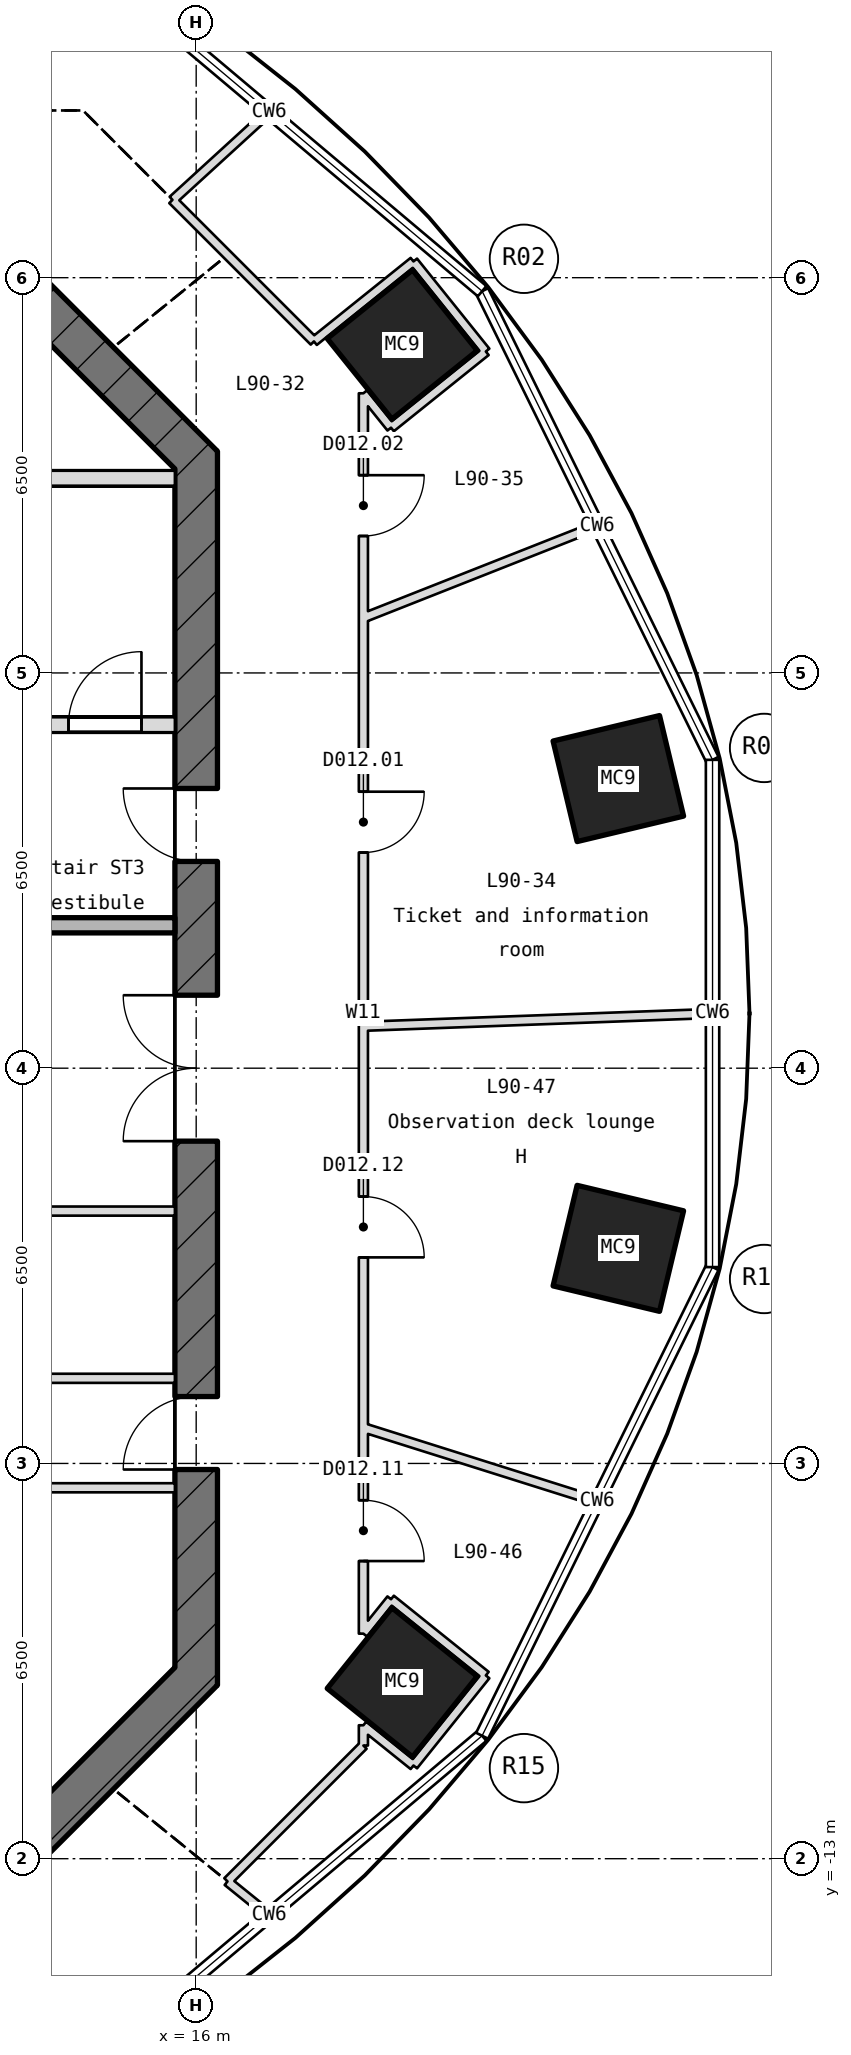
"""IFC4 building model, lengths in metres.
Left out: names, types, materials, properties, quantities, classifications, styles, units other than length and angle.
Written with IfcOpenShell. Run it as: python <this file> out.ifc"""

import sys

from ifc_helpers import new_model, si_unit, direction, frame, frame_2d, origin, origin_2d, place, context, subcontext, project, spatial, rectangle, hollow_rectangle, extrude, element, fill, save


model = new_model("IFC4")
c1 = context("Model", 3, precision=1e-05, world=origin(), true_north=direction((0.0, 1.0)))
c2 = subcontext(c1, "Body", "Model", "MODEL_VIEW")
j1 = project(units=[si_unit("LENGTHUNIT", "METRE"), si_unit("PLANEANGLEUNIT", "RADIAN")], contexts=[c1])
p1 = place(None, origin())
s1 = spatial("IfcSite", under=j1, at=p1, CompositionType="ELEMENT")
p2 = place(p1, origin())
s2 = spatial("IfcBuilding", under=s1, at=p2, CompositionType="ELEMENT")
p3 = place(p2, frame((0.0, 0.0, 396.55)))
s3 = spatial("IfcBuildingStorey", under=s2, at=p3, CompositionType="ELEMENT", Elevation=396.55)
for number, where, z_axis, x_axis in (
    (1, (22.943, 4.763, -0.25), (0.0, 0.0, 1.0), (0.233, -0.973, 0.0)),
    (2, (19.389, 11.9, -0.25), (0.0, 0.0, 1.0), (0.626, -0.78, 0.0)),
    (3, (12.823, 17.363, -0.25), (0.0, 0.0, 1.0), (0.874, -0.486, 0.0)),
    (4, (12.823, -15.563, -0.25), (0.0, 0.0, 1.0), (-0.874, -0.486, 0.0)),
    (5, (19.389, -10.1, -0.25), (0.0, 0.0, 1.0), (-0.626, -0.78, 0.0)),
    (6, (22.943, -2.963, -0.25), (0.0, 0.0, 1.0), (-0.233, -0.973, 0.0)),
):
    element("IfcColumn", number, at=place(p3, frame(where, z_axis=z_axis, x_axis=x_axis)), inside=s3, PredefinedType="COLUMN", context=c2, shape_type="SweptSolid", body=[
        extrude(hollow_rectangle(XDim=1.7, YDim=1.8, WallThickness=0.05, at=origin_2d()), origin(), (0.0, 0.0, 1.0), 5.4),
    ])
p4 = place(p3, frame((12.897, -13.103, -0.25), z_axis=(0.0, 0.0, 1.0), x_axis=(0.707106781187, 0.707106781187, 0.0)))
e7 = element("IfcWall", 7, at=p4, inside=s3, PredefinedType="SHEAR", context=c2, shape_type="SweptSolid", body=[
    extrude(rectangle(XDim=4.533, YDim=0.7, at=frame_2d((2.266, 0.0))), origin(), (0.0, 0.0, 1.0), 5.4),
])
p5 = place(p3, frame((16.0, -10.145, -0.25), z_axis=(0.0, 0.0, 1.0), x_axis=(0.0, 1.0, 0.0)))
e8 = element("IfcWall", 8, at=p5, inside=s3, PredefinedType="SHEAR", context=c2, shape_type="SweptSolid", body=[
    extrude(rectangle(XDim=20.29, YDim=0.7, at=frame_2d((10.145, 0.0))), origin(), (0.0, 0.0, 1.0), 5.4),
])
p6 = place(p5, frame((8.945, 0.0, 0.25)))
e9 = element("IfcOpeningElement", 9, at=p6, cuts=e8, PredefinedType="OPENING", context=c2, shape_type="SweptSolid", body=[
    extrude(rectangle(XDim=2.4, YDim=2.1, at=frame_2d((1.2, 1.05))), frame((0.0, 0.36, 0.0), z_axis=(0.0, -1.0, 0.0), x_axis=(1.0, 0.0, 0.0)), (0.0, 0.0, 1.0), 0.72),
])
p7 = place(p5, frame((13.545, 0.0, 0.25)))
e10 = element("IfcOpeningElement", 10, at=p7, cuts=e8, PredefinedType="OPENING", context=c2, shape_type="SweptSolid", body=[
    extrude(rectangle(XDim=1.2, YDim=2.1, at=frame_2d((0.6, 1.05))), frame((0.0, 0.36, 0.0), z_axis=(0.0, -1.0, 0.0), x_axis=(1.0, 0.0, 0.0)), (0.0, 0.0, 1.0), 0.72),
])
p8 = place(p5, frame((3.545, 0.0, 0.25)))
e11 = element("IfcOpeningElement", 11, at=p8, cuts=e8, PredefinedType="OPENING", context=c2, shape_type="SweptSolid", body=[
    extrude(rectangle(XDim=1.2, YDim=2.1, at=frame_2d((0.6, 1.05))), frame((0.0, 0.36, 0.0), z_axis=(0.0, -1.0, 0.0), x_axis=(1.0, 0.0, 0.0)), (0.0, 0.0, 1.0), 0.72),
])
p9 = place(p3, frame((16.103, 9.897, -0.25), z_axis=(0.0, 0.0, 1.0), x_axis=(-0.707106781187, 0.707106781187, 0.0)))
e12 = element("IfcWall", 12, at=p9, inside=s3, PredefinedType="SHEAR", context=c2, shape_type="SweptSolid", body=[
    extrude(rectangle(XDim=4.533, YDim=0.7, at=frame_2d((2.266, 0.0))), origin(), (0.0, 0.0, 1.0), 5.4),
])
p10 = place(p3, frame((8.55, -6.9, 0.0), z_axis=(0.0, 0.0, 1.0), x_axis=(1.0, 0.0, 0.0)))
e13 = element("IfcWall", 13, at=p10, inside=s3, PredefinedType="PARTITIONING", context=c2, shape_type="SweptSolid", body=[
    extrude(rectangle(XDim=7.1, YDim=0.15, at=frame_2d((3.55, 0.0))), origin(), (0.0, 0.0, 1.0), 5.15),
])
p11 = place(p10, frame((2.975, 0.0, 0.0)))
e14 = element("IfcOpeningElement", 14, at=p11, cuts=e13, PredefinedType="OPENING", context=c2, shape_type="SweptSolid", body=[
    extrude(rectangle(XDim=1.0, YDim=2.1, at=frame_2d((0.5, 1.05))), frame((0.0, 0.085, 0.0), z_axis=(0.0, -1.0, 0.0), x_axis=(1.0, 0.0, 0.0)), (0.0, 0.0, 1.0), 0.17),
])
p12 = place(p3, frame((8.55, -5.1, 0.0), z_axis=(0.0, 0.0, 1.0), x_axis=(1.0, 0.0, 0.0)))
e15 = element("IfcWall", 15, at=p12, inside=s3, PredefinedType="PARTITIONING", context=c2, shape_type="SweptSolid", body=[
    extrude(rectangle(XDim=7.1, YDim=0.15, at=frame_2d((3.55, 0.0))), origin(), (0.0, 0.0, 1.0), 5.15),
])
p13 = place(p12, frame((2.975, 0.0, 0.0)))
e16 = element("IfcOpeningElement", 16, at=p13, cuts=e15, PredefinedType="OPENING", context=c2, shape_type="SweptSolid", body=[
    extrude(rectangle(XDim=1.0, YDim=2.1, at=frame_2d((0.5, 1.05))), frame((0.0, 0.085, 0.0), z_axis=(0.0, -1.0, 0.0), x_axis=(1.0, 0.0, 0.0)), (0.0, 0.0, 1.0), 0.17),
])
p14 = place(p3, frame((8.4, -2.35, 0.0), z_axis=(0.0, 0.0, 1.0), x_axis=(1.0, 0.0, 0.0)))
e17 = element("IfcWall", 17, at=p14, inside=s3, PredefinedType="PARTITIONING", context=c2, shape_type="SweptSolid", body=[
    extrude(rectangle(XDim=7.25, YDim=0.15, at=frame_2d((3.625, 0.0))), origin(), (0.0, 0.0, 1.0), 5.15),
])
p15 = place(p3, frame((8.4, 2.35, 0.0), z_axis=(0.0, 0.0, 1.0), x_axis=(1.0, 0.0, 0.0)))
e18 = element("IfcWall", 18, at=p15, inside=s3, PredefinedType="STANDARD", context=c2, shape_type="SweptSolid", body=[
    extrude(rectangle(XDim=7.25, YDim=0.25, at=frame_2d((3.625, 0.0))), origin(), (0.0, 0.0, 1.0), 5.15),
])
p16 = place(p3, frame((8.55, 5.65, -0.25), z_axis=(0.0, 0.0, 1.0), x_axis=(1.0, 0.0, 0.0)))
e19 = element("IfcWall", 19, at=p16, inside=s3, PredefinedType="SHEAR", context=c2, shape_type="SweptSolid", body=[
    extrude(rectangle(XDim=7.1, YDim=0.25, at=frame_2d((3.55, 0.0))), origin(), (0.0, 0.0, 1.0), 5.4),
])
p17 = place(p16, frame((5.35, 0.0, 0.25)))
e20 = element("IfcOpeningElement", 20, at=p17, cuts=e19, PredefinedType="OPENING", context=c2, shape_type="SweptSolid", body=[
    extrude(rectangle(XDim=1.2, YDim=2.1, at=frame_2d((0.6, 1.05))), frame((0.0, 0.135, 0.0), z_axis=(0.0, -1.0, 0.0), x_axis=(1.0, 0.0, 0.0)), (0.0, 0.0, 1.0), 0.27),
])
p18 = place(p3, frame((8.55, 9.7, -0.25), z_axis=(0.0, 0.0, 1.0), x_axis=(1.0, 0.0, 0.0)))
e21 = element("IfcWall", 21, at=p18, inside=s3, PredefinedType="SHEAR", context=c2, shape_type="SweptSolid", body=[
    extrude(rectangle(XDim=7.1, YDim=0.25, at=frame_2d((3.55, 0.0))), origin(), (0.0, 0.0, 1.0), 5.4),
])
p19 = place(p3, frame((18.75, 0.689, 0.0), z_axis=(0.0, 0.0, 1.0), x_axis=(0.999324436598, 0.036751468252, 0.0)))
e22 = element("IfcWall", 22, at=p19, inside=s3, PredefinedType="PARTITIONING", context=c2, shape_type="SweptSolid", body=[
    extrude(rectangle(XDim=5.726, YDim=0.15, at=frame_2d((2.863, 0.0))), origin(), (0.0, 0.0, 1.0), 5.15),
])
p20 = place(p3, frame((18.75, 7.405, 0.0), z_axis=(0.0, 0.0, 1.0), x_axis=(0.930087514152, 0.367338013305, 0.0)))
e23 = element("IfcWall", 23, at=p20, inside=s3, PredefinedType="PARTITIONING", context=c2, shape_type="SweptSolid", body=[
    extrude(rectangle(XDim=4.117, YDim=0.15, at=frame_2d((2.058, 0.0))), origin(), (0.0, 0.0, 1.0), 5.15),
])
p21 = place(p3, frame((19.204, 10.533, 0.0), z_axis=(0.0, 0.0, 1.0), x_axis=(0.779700462406, 0.626152688187, 0.0)))
e24 = element("IfcWall", 24, at=p21, inside=s3, PredefinedType="PARTITIONING", context=c2, shape_type="SweptSolid", body=[
    extrude(rectangle(XDim=2.0, YDim=0.15, at=frame_2d((1.0, 0.0))), origin(), (0.0, 0.0, 1.0), 5.15),
])
p22 = place(p3, frame((17.937, 11.952, 0.0), z_axis=(0.0, 0.0, 1.0), x_axis=(0.779676200118, 0.626182898976, 0.0)))
e25 = element("IfcWall", 25, at=p22, inside=s3, PredefinedType="PARTITIONING", context=c2, shape_type="SweptSolid", body=[
    extrude(rectangle(XDim=2.1, YDim=0.15, at=frame_2d((1.05, 0.0))), origin(), (0.0, 0.0, 1.0), 5.15),
])
p23 = place(p3, frame((15.614, 14.276, 0.0), z_axis=(0.0, 0.0, 1.0), x_axis=(0.738014143535, 0.674785242831, 0.0)))
e26 = element("IfcWall", 26, at=p23, inside=s3, PredefinedType="PARTITIONING", context=c2, shape_type="SweptSolid", body=[
    extrude(rectangle(XDim=2.131, YDim=0.15, at=frame_2d((1.066, 0.0))), origin(), (0.0, 0.0, 1.0), 5.15),
])
p24 = place(p3, frame((16.515, -13.374, 0.0), z_axis=(0.0, 0.0, 1.0), x_axis=(0.707106781187, 0.707106781187, 0.0)))
e27 = element("IfcWall", 27, at=p24, inside=s3, PredefinedType="PARTITIONING", context=c2, shape_type="SweptSolid", body=[
    extrude(rectangle(XDim=3.16, YDim=0.15, at=frame_2d((1.58, 0.0))), origin(), (0.0, 0.0, 1.0), 5.15),
])
p25 = place(p3, frame((19.574, -11.467, 0.0), z_axis=(0.0, 0.0, 1.0), x_axis=(0.6262293762, 0.779638870493, 0.0)))
e28 = element("IfcWall", 28, at=p25, inside=s3, PredefinedType="PARTITIONING", context=c2, shape_type="SweptSolid", body=[
    extrude(rectangle(XDim=1.9, YDim=0.15, at=frame_2d((0.95, 0.0))), origin(), (0.0, 0.0, 1.0), 5.15),
])
p26 = place(p3, frame((18.75, -9.299, 0.0), z_axis=(0.0, 0.0, 1.0), x_axis=(0.626007581317, 0.77981697092, 0.0)))
e29 = element("IfcWall", 29, at=p26, inside=s3, PredefinedType="PARTITIONING", context=c2, shape_type="SweptSolid", body=[
    extrude(rectangle(XDim=0.725, YDim=0.15, at=frame_2d((0.363, 0.0))), origin(), (0.0, 0.0, 1.0), 5.15),
])
p27 = place(p3, frame((18.75, -11.139, 0.0), z_axis=(0.0, 0.0, 1.0), x_axis=(0.0, 1.0, 0.0)))
e30 = element("IfcWall", 30, at=p27, inside=s3, PredefinedType="PARTITIONING", context=c2, shape_type="SweptSolid", body=[
    extrude(rectangle(XDim=0.333, YDim=0.15, at=frame_2d((0.167, 0.0))), origin(), (0.0, 0.0, 1.0), 5.15),
])
p28 = place(p3, frame((18.75, -9.299, 0.0), z_axis=(0.0, 0.0, 1.0), x_axis=(0.0, 1.0, 0.0)))
e31 = element("IfcWall", 31, at=p28, inside=s3, PredefinedType="PARTITIONING", context=c2, shape_type="SweptSolid", body=[
    extrude(rectangle(XDim=20.398, YDim=0.15, at=frame_2d((10.199, 0.0))), origin(), (0.0, 0.0, 1.0), 5.15),
])
p29 = place(p28, frame((12.846, 0.0, 0.0)))
e32 = element("IfcOpeningElement", 32, at=p29, cuts=e31, PredefinedType="OPENING", context=c2, shape_type="SweptSolid", body=[
    extrude(rectangle(XDim=1.0, YDim=2.1, at=frame_2d((0.5, 1.05))), frame((0.0, 0.085, 0.0), z_axis=(0.0, -1.0, 0.0), x_axis=(1.0, 0.0, 0.0)), (0.0, 0.0, 1.0), 0.17),
])
p30 = place(p28, frame((18.051, 0.0, 0.0)))
e33 = element("IfcOpeningElement", 33, at=p30, cuts=e31, PredefinedType="OPENING", context=c2, shape_type="SweptSolid", body=[
    extrude(rectangle(XDim=1.0, YDim=2.1, at=frame_2d((0.5, 1.05))), frame((0.0, 0.085, 0.0), z_axis=(0.0, -1.0, 0.0), x_axis=(1.0, 0.0, 0.0)), (0.0, 0.0, 1.0), 0.17),
])
p31 = place(p28, frame((1.194, 0.0, 0.0)))
e34 = element("IfcOpeningElement", 34, at=p31, cuts=e31, PredefinedType="OPENING", context=c2, shape_type="SweptSolid", body=[
    extrude(rectangle(XDim=1.0, YDim=2.1, at=frame_2d((0.5, 1.05))), frame((0.0, 0.085, 0.0), z_axis=(0.0, -1.0, 0.0), x_axis=(1.0, 0.0, 0.0)), (0.0, 0.0, 1.0), 0.17),
])
p32 = place(p28, frame((6.188, 0.0, 0.0)))
e35 = element("IfcOpeningElement", 35, at=p32, cuts=e31, PredefinedType="OPENING", context=c2, shape_type="SweptSolid", body=[
    extrude(rectangle(XDim=1.0, YDim=2.1, at=frame_2d((0.5, 1.05))), frame((0.0, 0.085, 0.0), z_axis=(0.0, -1.0, 0.0), x_axis=(1.0, 0.0, 0.0)), (0.0, 0.0, 1.0), 0.17),
])
p33 = place(p3, frame((20.764, 11.786, 0.0), z_axis=(0.0, 0.0, 1.0), x_axis=(-0.626292110391, 0.779588476353, 0.0)))
e36 = element("IfcWall", 36, at=p33, inside=s3, PredefinedType="PARTITIONING", context=c2, shape_type="SweptSolid", body=[
    extrude(rectangle(XDim=1.9, YDim=0.15, at=frame_2d((0.95, 0.0))), origin(), (0.0, 0.0, 1.0), 5.15),
])
p34 = place(p3, frame((19.204, 10.533, 0.0), z_axis=(0.0, 0.0, 1.0), x_axis=(-0.626007581317, 0.77981697092, 0.0)))
e37 = element("IfcWall", 37, at=p34, inside=s3, PredefinedType="PARTITIONING", context=c2, shape_type="SweptSolid", body=[
    extrude(rectangle(XDim=0.725, YDim=0.15, at=frame_2d((0.363, 0.0))), origin(), (0.0, 0.0, 1.0), 5.15),
])
p35 = place(p3, frame((17.937, 11.952, 0.0), z_axis=(0.0, 0.0, 1.0), x_axis=(-0.707106781187, 0.707106781187, 0.0)))
e38 = element("IfcWall", 38, at=p35, inside=s3, PredefinedType="PARTITIONING", context=c2, shape_type="SweptSolid", body=[
    extrude(rectangle(XDim=3.29, YDim=0.15, at=frame_2d((1.645, 0.0))), origin(), (0.0, 0.0, 1.0), 5.15),
])
p36 = place(p3, frame((20.764, -9.986, 0.0), z_axis=(0.0, 0.0, 1.0), x_axis=(-0.779700462406, 0.626152688187, 0.0)))
e39 = element("IfcWall", 39, at=p36, inside=s3, PredefinedType="PARTITIONING", context=c2, shape_type="SweptSolid", body=[
    extrude(rectangle(XDim=2.0, YDim=0.15, at=frame_2d((1.0, 0.0))), origin(), (0.0, 0.0, 1.0), 5.15),
])
p37 = place(p3, frame((19.574, -11.467, 0.0), z_axis=(0.0, 0.0, 1.0), x_axis=(-0.779649951453, 0.62621558045, 0.0)))
e40 = element("IfcWall", 40, at=p37, inside=s3, PredefinedType="PARTITIONING", context=c2, shape_type="SweptSolid", body=[
    extrude(rectangle(XDim=1.057, YDim=0.15, at=frame_2d((0.528, 0.0))), origin(), (0.0, 0.0, 1.0), 5.15),
])
p38 = place(p3, frame((17.185, -13.916, 0.0), z_axis=(0.0, 0.0, 1.0), x_axis=(-0.77706665064, 0.629418319136, 0.0)))
e41 = element("IfcWall", 41, at=p38, inside=s3, PredefinedType="PARTITIONING", context=c2, shape_type="SweptSolid", body=[
    extrude(rectangle(XDim=0.862, YDim=0.15, at=frame_2d((0.431, 0.0))), origin(), (0.0, 0.0, 1.0), 5.15),
])
p39 = place(p3, frame((22.578, -7.118, 0.0), z_axis=(0.0, 0.0, 1.0), x_axis=(-0.953732387446, 0.30065683617, 0.0)))
e42 = element("IfcWall", 42, at=p39, inside=s3, PredefinedType="PARTITIONING", context=c2, shape_type="SweptSolid", body=[
    extrude(rectangle(XDim=4.014, YDim=0.15, at=frame_2d((2.007, 0.0))), origin(), (0.0, 0.0, 1.0), 5.15),
])
p40 = place(p17, origin())
e43 = element("IfcDoor", 43, at=p40, inside=s3, OperationType="SINGLE_SWING_RIGHT", PredefinedType="DOOR", context=c2, shape_type="SweptSolid", body=[
    extrude(rectangle(XDim=1.2, YDim=2.1, at=frame_2d((0.6, 1.05))), frame((0.0, 0.025, 0.0), z_axis=(0.0, -1.0, 0.0), x_axis=(1.0, 0.0, 0.0)), (0.0, 0.0, 1.0), 0.05),
])
fill(e20, e43)
p41 = place(p6, origin())
e44 = element("IfcDoor", 44, at=p41, inside=s3, OperationType="DOUBLE_DOOR_SINGLE_SWING", PredefinedType="DOOR", context=c2, shape_type="SweptSolid", body=[
    extrude(rectangle(XDim=2.4, YDim=2.1, at=frame_2d((1.2, 1.05))), frame((0.0, 0.025, 0.0), z_axis=(0.0, -1.0, 0.0), x_axis=(1.0, 0.0, 0.0)), (0.0, 0.0, 1.0), 0.05),
])
fill(e9, e44)
p42 = place(p7, origin())
e45 = element("IfcDoor", 45, at=p42, inside=s3, OperationType="SINGLE_SWING_RIGHT", PredefinedType="DOOR", context=c2, shape_type="SweptSolid", body=[
    extrude(rectangle(XDim=1.2, YDim=2.1, at=frame_2d((0.6, 1.05))), frame((0.0, 0.025, 0.0), z_axis=(0.0, -1.0, 0.0), x_axis=(1.0, 0.0, 0.0)), (0.0, 0.0, 1.0), 0.05),
])
fill(e10, e45)
p43 = place(p8, origin())
e46 = element("IfcDoor", 46, at=p43, inside=s3, OperationType="SINGLE_SWING_RIGHT", PredefinedType="DOOR", context=c2, shape_type="SweptSolid", body=[
    extrude(rectangle(XDim=1.2, YDim=2.1, at=frame_2d((0.6, 1.05))), frame((0.0, 0.025, 0.0), z_axis=(0.0, -1.0, 0.0), x_axis=(1.0, 0.0, 0.0)), (0.0, 0.0, 1.0), 0.05),
])
fill(e11, e46)
p44 = place(p29, frame((1.0, 0.0, 0.0), z_axis=(0.0, 0.0, 1.0), x_axis=(-1.0, 0.0, 0.0)))
e47 = element("IfcDoor", 47, at=p44, inside=s3, OperationType="SINGLE_SWING_LEFT", PredefinedType="DOOR", context=c2, shape_type="SweptSolid", body=[
    extrude(rectangle(XDim=1.0, YDim=2.1, at=frame_2d((0.5, 1.05))), frame((0.0, 0.025, 0.0), z_axis=(0.0, -1.0, 0.0), x_axis=(1.0, 0.0, 0.0)), (0.0, 0.0, 1.0), 0.05),
])
fill(e32, e47)
p45 = place(p30, frame((1.0, 0.0, 0.0), z_axis=(0.0, 0.0, 1.0), x_axis=(-1.0, 0.0, 0.0)))
e48 = element("IfcDoor", 48, at=p45, inside=s3, OperationType="SINGLE_SWING_LEFT", PredefinedType="DOOR", context=c2, shape_type="SweptSolid", body=[
    extrude(rectangle(XDim=1.0, YDim=2.1, at=frame_2d((0.5, 1.05))), frame((0.0, 0.025, 0.0), z_axis=(0.0, -1.0, 0.0), x_axis=(1.0, 0.0, 0.0)), (0.0, 0.0, 1.0), 0.05),
])
fill(e33, e48)
p46 = place(p31, frame((1.0, 0.0, 0.0), z_axis=(0.0, 0.0, 1.0), x_axis=(-1.0, 0.0, 0.0)))
e49 = element("IfcDoor", 49, at=p46, inside=s3, OperationType="SINGLE_SWING_LEFT", PredefinedType="DOOR", context=c2, shape_type="SweptSolid", body=[
    extrude(rectangle(XDim=1.0, YDim=2.1, at=frame_2d((0.5, 1.05))), frame((0.0, 0.025, 0.0), z_axis=(0.0, -1.0, 0.0), x_axis=(1.0, 0.0, 0.0)), (0.0, 0.0, 1.0), 0.05),
])
fill(e34, e49)
p47 = place(p32, frame((1.0, 0.0, 0.0), z_axis=(0.0, 0.0, 1.0), x_axis=(-1.0, 0.0, 0.0)))
e50 = element("IfcDoor", 50, at=p47, inside=s3, OperationType="SINGLE_SWING_LEFT", PredefinedType="DOOR", context=c2, shape_type="SweptSolid", body=[
    extrude(rectangle(XDim=1.0, YDim=2.1, at=frame_2d((0.5, 1.05))), frame((0.0, 0.025, 0.0), z_axis=(0.0, -1.0, 0.0), x_axis=(1.0, 0.0, 0.0)), (0.0, 0.0, 1.0), 0.05),
])
fill(e35, e50)
save(model, sys.argv[1])
